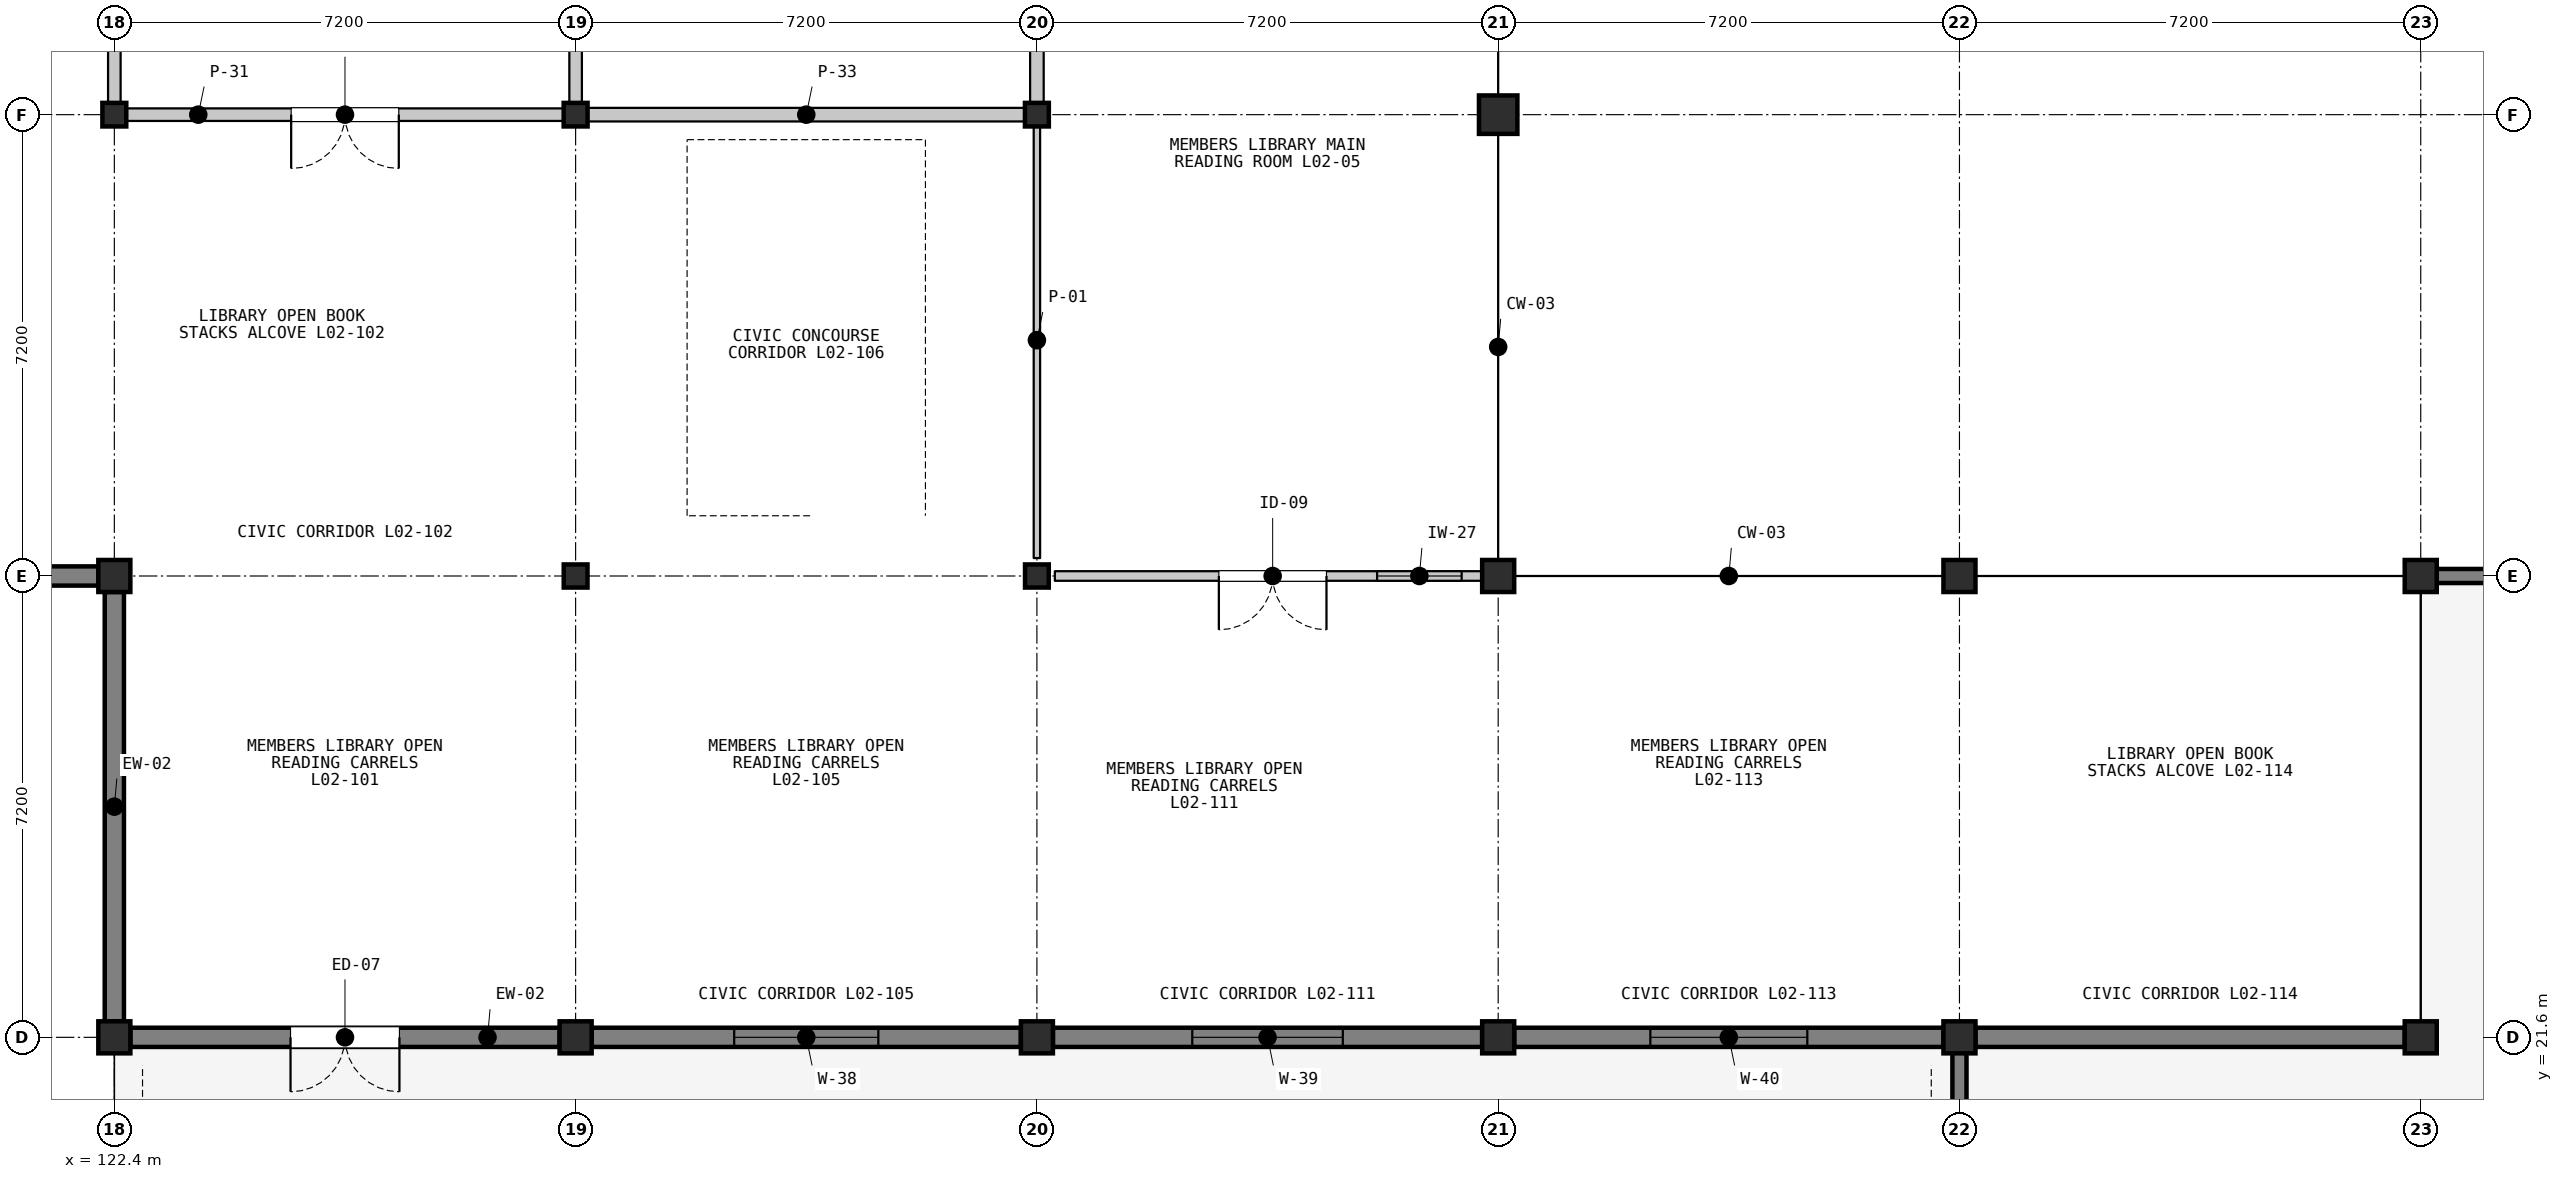
"""IFC4 building model, lengths in metres.
Left out: names, types, materials, properties, quantities, classifications, styles, units other than length and angle.
Written with IfcOpenShell. Run it as: python <this file> out.ifc"""

import sys

from ifc_helpers import new_model, si_unit, direction, frame, frame_2d, origin, origin_2d, place, context, subcontext, project, spatial, rectangle, i_section, extrude, element, fill, save


model = new_model("IFC4")
c1 = context("Model", 3, precision=1e-05, world=origin(), true_north=direction((0.0, 1.0)))
c2 = subcontext(c1, "Body", "Model", "MODEL_VIEW")
j1 = project(units=[si_unit("LENGTHUNIT", "METRE"), si_unit("PLANEANGLEUNIT", "RADIAN")], contexts=[c1])
p1 = place(None, origin())
s1 = spatial("IfcSite", under=j1, at=p1, CompositionType="ELEMENT")
p2 = place(p1, origin())
s2 = spatial("IfcBuilding", under=s1, at=p2, CompositionType="ELEMENT")
p3 = place(p2, frame((0.0, 0.0, 5.4)))
s3 = spatial("IfcBuildingStorey", under=s2, at=p3, CompositionType="ELEMENT", Elevation=5.4)
for number, where, z_axis, x_axis in (
    (1, (122.4, 21.6, 0.0), (0.0, 0.0, 1.0), (1.0, 0.0, 0.0)),
    (2, (122.4, 28.8, 0.0), (0.0, 0.0, 1.0), (1.0, 0.0, 0.0)),
):
    element("IfcColumn", number, at=place(p3, frame(where, z_axis=z_axis, x_axis=x_axis)), inside=s3, PredefinedType="COLUMN", context=c2, shape_type="SweptSolid", body=[
        extrude(rectangle(XDim=0.5, YDim=0.5, at=origin_2d()), origin(), (0.0, 0.0, 1.0), 4.5),
    ])
p4 = place(p3, frame((122.4, 36.0, 0.0), z_axis=(0.0, 0.0, 1.0), x_axis=(1.0, 0.0, 0.0)))
e3 = element("IfcColumn", 3, at=p4, inside=s3, PredefinedType="COLUMN", context=c2, shape_type="SweptSolid", body=[
    extrude(i_section(OverallWidth=0.373, OverallDepth=0.368, WebThickness=0.015, FlangeThickness=0.024, FilletRadius=0.015, at=origin_2d()), origin(), (0.0, 0.0, 1.0), 4.5),
])
p5 = place(p3, frame((129.6, 21.6, 0.0), z_axis=(0.0, 0.0, 1.0), x_axis=(1.0, 0.0, 0.0)))
e4 = element("IfcColumn", 4, at=p5, inside=s3, PredefinedType="COLUMN", context=c2, shape_type="SweptSolid", body=[
    extrude(rectangle(XDim=0.5, YDim=0.5, at=origin_2d()), origin(), (0.0, 0.0, 1.0), 4.5),
])
p6 = place(p3, frame((129.6, 28.8, 0.0), z_axis=(0.0, 0.0, 1.0), x_axis=(1.0, 0.0, 0.0)))
e5 = element("IfcColumn", 5, at=p6, inside=s3, PredefinedType="COLUMN", context=c2, shape_type="SweptSolid", body=[
    extrude(i_section(OverallWidth=0.371, OverallDepth=0.361, WebThickness=0.012, FlangeThickness=0.02, FilletRadius=0.015, at=origin_2d()), origin(), (0.0, 0.0, 1.0), 4.5),
])
p7 = place(p3, frame((129.6, 36.0, 0.0), z_axis=(0.0, 0.0, 1.0), x_axis=(1.0, 0.0, 0.0)))
e6 = element("IfcColumn", 6, at=p7, inside=s3, PredefinedType="COLUMN", context=c2, shape_type="SweptSolid", body=[
    extrude(i_section(OverallWidth=0.373, OverallDepth=0.368, WebThickness=0.015, FlangeThickness=0.024, FilletRadius=0.015, at=origin_2d()), origin(), (0.0, 0.0, 1.0), 4.5),
])
p8 = place(p3, frame((136.8, 21.6, 0.0), z_axis=(0.0, 0.0, 1.0), x_axis=(1.0, 0.0, 0.0)))
e7 = element("IfcColumn", 7, at=p8, inside=s3, PredefinedType="COLUMN", context=c2, shape_type="SweptSolid", body=[
    extrude(rectangle(XDim=0.5, YDim=0.5, at=origin_2d()), origin(), (0.0, 0.0, 1.0), 4.5),
])
p9 = place(p3, frame((136.8, 28.8, 0.0), z_axis=(0.0, 0.0, 1.0), x_axis=(1.0, 0.0, 0.0)))
e8 = element("IfcColumn", 8, at=p9, inside=s3, PredefinedType="COLUMN", context=c2, shape_type="SweptSolid", body=[
    extrude(i_section(OverallWidth=0.371, OverallDepth=0.361, WebThickness=0.012, FlangeThickness=0.02, FilletRadius=0.015, at=origin_2d()), origin(), (0.0, 0.0, 1.0), 4.5),
])
p10 = place(p3, frame((136.8, 36.0, 0.0), z_axis=(0.0, 0.0, 1.0), x_axis=(1.0, 0.0, 0.0)))
e9 = element("IfcColumn", 9, at=p10, inside=s3, PredefinedType="COLUMN", context=c2, shape_type="SweptSolid", body=[
    extrude(i_section(OverallWidth=0.373, OverallDepth=0.368, WebThickness=0.015, FlangeThickness=0.024, FilletRadius=0.015, at=origin_2d()), origin(), (0.0, 0.0, 1.0), 4.5),
])
for number, where, z_axis, x_axis in (
    (10, (144.0, 21.6, 0.0), (0.0, 0.0, 1.0), (1.0, 0.0, 0.0)),
    (11, (144.0, 28.8, 0.0), (0.0, 0.0, 1.0), (1.0, 0.0, 0.0)),
):
    element("IfcColumn", number, at=place(p3, frame(where, z_axis=z_axis, x_axis=x_axis)), inside=s3, PredefinedType="COLUMN", context=c2, shape_type="SweptSolid", body=[
        extrude(rectangle(XDim=0.5, YDim=0.5, at=origin_2d()), origin(), (0.0, 0.0, 1.0), 4.5),
    ])
p11 = place(p3, frame((144.0, 36.0, 0.0), z_axis=(0.0, 0.0, 1.0), x_axis=(1.0, 0.0, 0.0)))
e12 = element("IfcColumn", 12, at=p11, inside=s3, PredefinedType="COLUMN", context=c2, shape_type="SweptSolid", body=[
    extrude(rectangle(XDim=0.6, YDim=0.6, at=origin_2d()), origin(), (0.0, 0.0, 1.0), 4.5),
])
for number, where, z_axis, x_axis in (
    (13, (151.2, 21.6, 0.0), (0.0, 0.0, 1.0), (1.0, 0.0, 0.0)),
    (14, (151.2, 28.8, 0.0), (0.0, 0.0, 1.0), (1.0, 0.0, 0.0)),
    (15, (158.4, 21.6, 0.0), (0.0, 0.0, 1.0), (1.0, 0.0, 0.0)),
    (16, (158.4, 28.8, 0.0), (0.0, 0.0, 1.0), (1.0, 0.0, 0.0)),
):
    element("IfcColumn", number, at=place(p3, frame(where, z_axis=z_axis, x_axis=x_axis)), inside=s3, PredefinedType="COLUMN", context=c2, shape_type="SweptSolid", body=[
        extrude(rectangle(XDim=0.5, YDim=0.5, at=origin_2d()), origin(), (0.0, 0.0, 1.0), 4.5),
    ])
p12 = place(p3, frame((122.15, 28.8, 0.0), z_axis=(0.0, 0.0, 1.0), x_axis=(-1.0, 0.0, 0.0)))
e17 = element("IfcWall", 17, at=p12, inside=s3, PredefinedType="SOLIDWALL", context=c2, shape_type="SweptSolid", body=[
    extrude(rectangle(XDim=6.65, YDim=0.3, at=frame_2d((3.325, 0.0))), origin(), (0.0, 0.0, 1.0), 3.698),
])
p13 = place(p12, frame((2.1, 0.0, 0.95)))
e18 = element("IfcOpeningElement", 18, at=p13, cuts=e17, PredefinedType="OPENING", context=c2, shape_type="SweptSolid", body=[
    extrude(rectangle(XDim=2.45, YDim=2.05, at=frame_2d((1.225, 1.025))), frame((0.0, 0.16, 0.0), z_axis=(0.0, -1.0, 0.0), x_axis=(1.0, 0.0, 0.0)), (0.0, 0.0, 1.0), 0.32),
])
p14 = place(p3, frame((129.35, 21.6, 0.0), z_axis=(0.0, 0.0, 1.0), x_axis=(-1.0, 0.0, 0.0)))
e19 = element("IfcWall", 19, at=p14, inside=s3, PredefinedType="SOLIDWALL", context=c2, shape_type="SweptSolid", body=[
    extrude(rectangle(XDim=6.7, YDim=0.3, at=frame_2d((3.35, 0.0))), origin(), (0.0, 0.0, 1.0), 3.688),
])
p15 = place(p14, frame((2.5, 0.0, 0.0)))
e20 = element("IfcOpeningElement", 20, at=p15, cuts=e19, PredefinedType="OPENING", context=c2, shape_type="SweptSolid", body=[
    extrude(rectangle(XDim=1.7, YDim=2.25, at=frame_2d((0.85, 1.125))), frame((0.0, 0.16, 0.0), z_axis=(0.0, -1.0, 0.0), x_axis=(1.0, 0.0, 0.0)), (0.0, 0.0, 1.0), 0.32),
])
p16 = place(p3, frame((122.4, 21.85, 0.0), z_axis=(0.0, 0.0, 1.0), x_axis=(0.0, 1.0, 0.0)))
e21 = element("IfcWall", 21, at=p16, inside=s3, PredefinedType="SOLIDWALL", context=c2, shape_type="SweptSolid", body=[
    extrude(rectangle(XDim=6.7, YDim=0.3, at=frame_2d((3.35, 0.0))), origin(), (0.0, 0.0, 1.0), 3.767),
])
p17 = place(p3, frame((136.55, 21.6, 0.0), z_axis=(0.0, 0.0, 1.0), x_axis=(-1.0, 0.0, 0.0)))
e22 = element("IfcWall", 22, at=p17, inside=s3, PredefinedType="SOLIDWALL", context=c2, shape_type="SweptSolid", body=[
    extrude(rectangle(XDim=6.7, YDim=0.3, at=frame_2d((3.35, 0.0))), origin(), (0.0, 0.0, 1.0), 3.688),
])
p18 = place(p17, frame((2.225, 0.0, 0.95)))
e23 = element("IfcOpeningElement", 23, at=p18, cuts=e22, PredefinedType="OPENING", context=c2, shape_type="SweptSolid", body=[
    extrude(rectangle(XDim=2.25, YDim=2.05, at=frame_2d((1.125, 1.025))), frame((0.0, 0.16, 0.0), z_axis=(0.0, -1.0, 0.0), x_axis=(1.0, 0.0, 0.0)), (0.0, 0.0, 1.0), 0.32),
])
p19 = place(p3, frame((143.75, 21.6, 0.0), z_axis=(0.0, 0.0, 1.0), x_axis=(-1.0, 0.0, 0.0)))
e24 = element("IfcWall", 24, at=p19, inside=s3, PredefinedType="SOLIDWALL", context=c2, shape_type="SweptSolid", body=[
    extrude(rectangle(XDim=6.7, YDim=0.3, at=frame_2d((3.35, 0.0))), origin(), (0.0, 0.0, 1.0), 3.688),
])
p20 = place(p19, frame((2.175, 0.0, 0.95)))
e25 = element("IfcOpeningElement", 25, at=p20, cuts=e24, PredefinedType="OPENING", context=c2, shape_type="SweptSolid", body=[
    extrude(rectangle(XDim=2.35, YDim=2.05, at=frame_2d((1.175, 1.025))), frame((0.0, 0.16, 0.0), z_axis=(0.0, -1.0, 0.0), x_axis=(1.0, 0.0, 0.0)), (0.0, 0.0, 1.0), 0.32),
])
p21 = place(p3, frame((150.95, 21.6, 0.0), z_axis=(0.0, 0.0, 1.0), x_axis=(-1.0, 0.0, 0.0)))
e26 = element("IfcWall", 26, at=p21, inside=s3, PredefinedType="SOLIDWALL", context=c2, shape_type="SweptSolid", body=[
    extrude(rectangle(XDim=6.7, YDim=0.3, at=frame_2d((3.35, 0.0))), origin(), (0.0, 0.0, 1.0), 3.688),
])
p22 = place(p21, frame((2.125, 0.0, 0.95)))
e27 = element("IfcOpeningElement", 27, at=p22, cuts=e26, PredefinedType="OPENING", context=c2, shape_type="SweptSolid", body=[
    extrude(rectangle(XDim=2.45, YDim=2.05, at=frame_2d((1.225, 1.025))), frame((0.0, 0.16, 0.0), z_axis=(0.0, -1.0, 0.0), x_axis=(1.0, 0.0, 0.0)), (0.0, 0.0, 1.0), 0.32),
])
p23 = place(p3, frame((158.15, 21.6, 0.0), z_axis=(0.0, 0.0, 1.0), x_axis=(-1.0, 0.0, 0.0)))
e28 = element("IfcWall", 28, at=p23, inside=s3, PredefinedType="SOLIDWALL", context=c2, shape_type="SweptSolid", body=[
    extrude(rectangle(XDim=6.7, YDim=0.3, at=frame_2d((3.35, 0.0))), origin(), (0.0, 0.0, 1.0), 3.688),
])
for number, where, z_axis, x_axis in (
    (29, (151.2, 14.55, 0.0), (0.0, 0.0, 1.0), (0.0, 1.0, 0.0)),
    (30, (158.55, 28.8, 0.0), (0.0, 0.0, 1.0), (1.0, 0.0, 0.0)),
):
    element("IfcWall", number, at=place(p3, frame(where, z_axis=z_axis, x_axis=x_axis)), inside=s3, PredefinedType="PARAPET", context=c2, shape_type="SweptSolid", body=[
        extrude(rectangle(XDim=6.9, YDim=0.22, at=frame_2d((3.45, 0.0))), origin(), (0.0, 0.0, 1.0), 0.85),
    ])
p24 = place(p3, frame((129.48, 36.0, 0.0), z_axis=(0.0, 0.0, 1.0), x_axis=(-1.0, 0.0, 0.0)))
e31 = element("IfcWall", 31, at=p24, inside=s3, PredefinedType="PARTITIONING", context=c2, shape_type="SweptSolid", body=[
    extrude(rectangle(XDim=6.96, YDim=0.196, at=frame_2d((3.48, 0.0))), origin(), (0.0, 0.0, 1.0), 3.678),
])
p25 = place(p24, frame((2.64, 0.0, 0.0)))
e32 = element("IfcOpeningElement", 32, at=p25, cuts=e31, PredefinedType="OPENING", context=c2, shape_type="SweptSolid", body=[
    extrude(rectangle(XDim=1.68, YDim=2.35, at=frame_2d((0.84, 1.175))), frame((0.0, 0.108, 0.0), z_axis=(0.0, -1.0, 0.0), x_axis=(1.0, 0.0, 0.0)), (0.0, 0.0, 1.0), 0.216),
])
p26 = place(p3, frame((122.4, 36.12, 0.0), z_axis=(0.0, 0.0, 1.0), x_axis=(0.0, 1.0, 0.0)))
e33 = element("IfcWall", 33, at=p26, inside=s3, PredefinedType="PARTITIONING", context=c2, shape_type="SweptSolid", body=[
    extrude(rectangle(XDim=6.8, YDim=0.196, at=frame_2d((3.4, 0.0))), origin(), (0.0, 0.0, 1.0), 3.678),
])
p27 = place(p3, frame((129.6, 43.08, 0.0), z_axis=(0.0, 0.0, 1.0), x_axis=(0.0, -1.0, 0.0)))
e34 = element("IfcWall", 34, at=p27, inside=s3, PredefinedType="PARTITIONING", context=c2, shape_type="SweptSolid", body=[
    extrude(rectangle(XDim=6.96, YDim=0.196, at=frame_2d((3.48, 0.0))), origin(), (0.0, 0.0, 1.0), 3.678),
])
p28 = place(p3, frame((136.68, 36.0, 0.0), z_axis=(0.0, 0.0, 1.0), x_axis=(-1.0, 0.0, 0.0)))
e35 = element("IfcWall", 35, at=p28, inside=s3, PredefinedType="PARTITIONING", context=c2, shape_type="SweptSolid", body=[
    extrude(rectangle(XDim=6.96, YDim=0.212, at=frame_2d((3.48, 0.0))), origin(), (0.0, 0.0, 1.0), 3.678),
])
p29 = place(p3, frame((136.8, 42.92, 0.0), z_axis=(0.0, 0.0, 1.0), x_axis=(0.0, -1.0, 0.0)))
e36 = element("IfcWall", 36, at=p29, inside=s3, PredefinedType="PARTITIONING", context=c2, shape_type="SweptSolid", body=[
    extrude(rectangle(XDim=6.8, YDim=0.212, at=frame_2d((3.4, 0.0))), origin(), (0.0, 0.0, 1.0), 3.678),
])
p30 = place(p3, frame((143.88, 28.8, 0.0), z_axis=(0.0, 0.0, 1.0), x_axis=(-1.0, 0.0, 0.0)))
e37 = element("IfcWall", 37, at=p30, inside=s3, PredefinedType="PARTITIONING", context=c2, shape_type="SweptSolid", body=[
    extrude(rectangle(XDim=6.8, YDim=0.15, at=frame_2d((3.4, 0.0))), origin(), (0.0, 0.0, 1.0), 3.678),
])
p31 = place(p30, frame((2.56, 0.0, 0.0)))
e38 = element("IfcOpeningElement", 38, at=p31, cuts=e37, PredefinedType="OPENING", context=c2, shape_type="SweptSolid", body=[
    extrude(rectangle(XDim=1.68, YDim=2.35, at=frame_2d((0.84, 1.175))), frame((0.0, 0.085, 0.0), z_axis=(0.0, -1.0, 0.0), x_axis=(1.0, 0.0, 0.0)), (0.0, 0.0, 1.0), 0.17),
])
p32 = place(p30, frame((0.45, 0.0, 1.05)))
e39 = element("IfcOpeningElement", 39, at=p32, cuts=e37, PredefinedType="OPENING", context=c2, shape_type="SweptSolid", body=[
    extrude(rectangle(XDim=1.32, YDim=0.92, at=frame_2d((0.66, 0.46))), frame((0.0, 0.085, 0.0), z_axis=(0.0, -1.0, 0.0), x_axis=(1.0, 0.0, 0.0)), (0.0, 0.0, 1.0), 0.17),
])
p33 = place(p3, frame((136.8, 29.08, 0.0), z_axis=(0.0, 0.0, 1.0), x_axis=(0.0, 1.0, 0.0)))
e40 = element("IfcWall", 40, at=p33, inside=s3, PredefinedType="PARTITIONING", context=c2, shape_type="SweptSolid", body=[
    extrude(rectangle(XDim=6.8, YDim=0.1, at=frame_2d((3.4, 0.0))), origin(), (0.0, 0.0, 1.0), 3.678),
])
p34 = place(p15, origin())
e41 = element("IfcDoor", 41, at=p34, inside=s3, OperationType="DOUBLE_DOOR_SINGLE_SWING", PredefinedType="DOOR", context=c2, shape_type="SweptSolid", body=[
    extrude(rectangle(XDim=1.7, YDim=2.25, at=frame_2d((0.85, 1.125))), frame((0.0, 0.025, 0.0), z_axis=(0.0, -1.0, 0.0), x_axis=(1.0, 0.0, 0.0)), (0.0, 0.0, 1.0), 0.05),
])
fill(e20, e41)
p35 = place(p18, origin())
e42 = element("IfcWindow", 42, at=p35, inside=s3, PartitioningType="SINGLE_PANEL", PredefinedType="WINDOW", context=c2, shape_type="SweptSolid", body=[
    extrude(rectangle(XDim=2.25, YDim=2.05, at=frame_2d((1.125, 1.025))), frame((0.0, 0.03, 0.0), z_axis=(0.0, -1.0, 0.0), x_axis=(1.0, 0.0, 0.0)), (0.0, 0.0, 1.0), 0.06),
])
fill(e23, e42)
p36 = place(p20, origin())
e43 = element("IfcWindow", 43, at=p36, inside=s3, PartitioningType="SINGLE_PANEL", PredefinedType="WINDOW", context=c2, shape_type="SweptSolid", body=[
    extrude(rectangle(XDim=2.35, YDim=2.05, at=frame_2d((1.175, 1.025))), frame((0.0, 0.03, 0.0), z_axis=(0.0, -1.0, 0.0), x_axis=(1.0, 0.0, 0.0)), (0.0, 0.0, 1.0), 0.06),
])
fill(e25, e43)
p37 = place(p22, origin())
e44 = element("IfcWindow", 44, at=p37, inside=s3, PartitioningType="SINGLE_PANEL", PredefinedType="WINDOW", context=c2, shape_type="SweptSolid", body=[
    extrude(rectangle(XDim=2.45, YDim=2.05, at=frame_2d((1.225, 1.025))), frame((0.0, 0.03, 0.0), z_axis=(0.0, -1.0, 0.0), x_axis=(1.0, 0.0, 0.0)), (0.0, 0.0, 1.0), 0.06),
])
fill(e27, e44)
p38 = place(p25, origin())
e45 = element("IfcDoor", 45, at=p38, inside=s3, OperationType="DOUBLE_DOOR_SINGLE_SWING", PredefinedType="DOOR", context=c2, shape_type="SweptSolid", body=[
    extrude(rectangle(XDim=1.68, YDim=2.35, at=frame_2d((0.84, 1.175))), frame((0.0, 0.025, 0.0), z_axis=(0.0, -1.0, 0.0), x_axis=(1.0, 0.0, 0.0)), (0.0, 0.0, 1.0), 0.05),
])
fill(e32, e45)
p39 = place(p31, origin())
e46 = element("IfcDoor", 46, at=p39, inside=s3, OperationType="DOUBLE_DOOR_SINGLE_SWING", PredefinedType="DOOR", context=c2, shape_type="SweptSolid", body=[
    extrude(rectangle(XDim=1.68, YDim=2.35, at=frame_2d((0.84, 1.175))), frame((0.0, 0.025, 0.0), z_axis=(0.0, -1.0, 0.0), x_axis=(1.0, 0.0, 0.0)), (0.0, 0.0, 1.0), 0.05),
])
fill(e38, e46)
p40 = place(p32, origin())
e47 = element("IfcWindow", 47, at=p40, inside=s3, PartitioningType="SINGLE_PANEL", PredefinedType="WINDOW", context=c2, shape_type="SweptSolid", body=[
    extrude(rectangle(XDim=1.32, YDim=0.92, at=frame_2d((0.66, 0.46))), frame((0.0, 0.03, 0.0), z_axis=(0.0, -1.0, 0.0), x_axis=(1.0, 0.0, 0.0)), (0.0, 0.0, 1.0), 0.06),
])
fill(e39, e47)
save(model, sys.argv[1])
